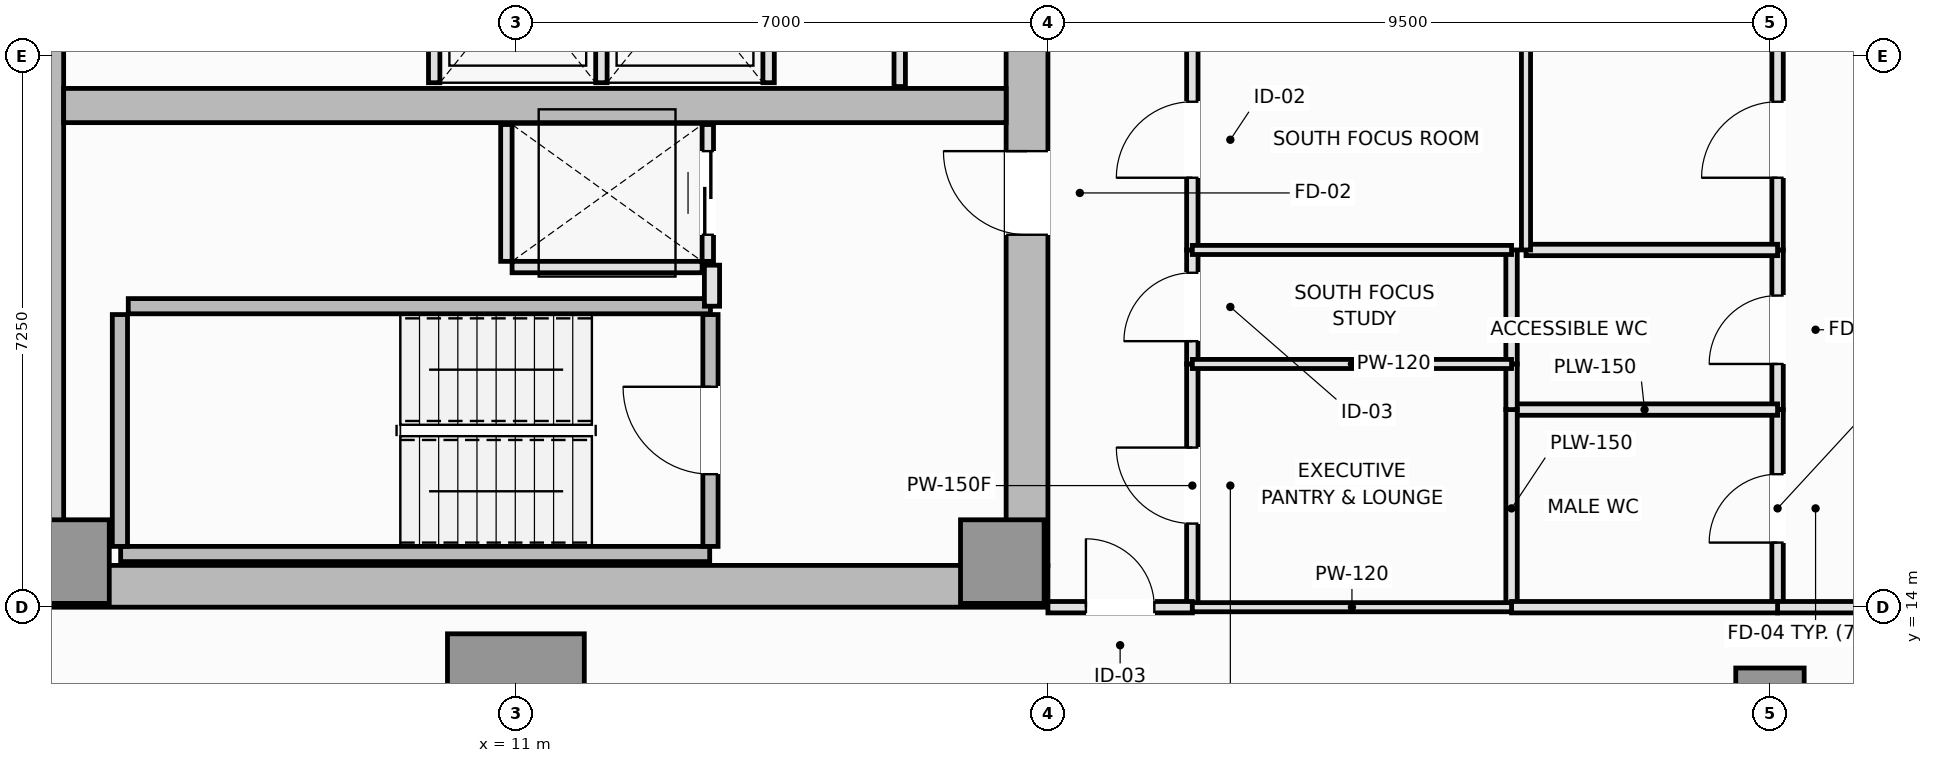
"""IFC4 building model, lengths in metres.
Left out: names, types, materials, properties, quantities, classifications, styles, units other than length and angle.
Written with IfcOpenShell. Run it as: python <this file> out.ifc"""

import sys

from ifc_helpers import new_model, si_unit, direction, frame, frame_2d, origin, origin_2d, place, context, subcontext, project, spatial, rectangle, extrude, element, fill, save


model = new_model("IFC4")
c1 = context("Model", 3, precision=1e-05, world=origin(), true_north=direction((0.0, 1.0)))
c2 = subcontext(c1, "Body", "Model", "MODEL_VIEW")
j1 = project(units=[si_unit("LENGTHUNIT", "METRE"), si_unit("PLANEANGLEUNIT", "RADIAN")], contexts=[c1])
p1 = place(None, origin())
s1 = spatial("IfcSite", under=j1, at=p1, CompositionType="ELEMENT")
p2 = place(p1, origin())
s2 = spatial("IfcBuilding", under=s1, at=p2, CompositionType="ELEMENT")
p3 = place(p2, frame((0.0, 0.0, 191.6)))
s3 = spatial("IfcBuildingStorey", under=s2, at=p3, CompositionType="ELEMENT", Elevation=191.6)
p4 = place(p3, frame((4.5, 14.275, 0.0), z_axis=(0.0, 0.0, 1.0), x_axis=(1.0, 0.0, 0.0)))
e1 = element("IfcWall", 1, at=p4, inside=s3, PredefinedType="SHEAR", context=c2, shape_type="SweptSolid", body=[
    extrude(rectangle(XDim=13.5, YDim=0.55, at=frame_2d((6.75, 0.0))), origin(), (0.0, 0.0, 1.0), 3.55),
])
p5 = place(p3, frame((4.775, 14.55, 0.0), z_axis=(0.0, 0.0, 1.0), x_axis=(0.0, 1.0, 0.0)))
e2 = element("IfcWall", 2, at=p5, inside=s3, PredefinedType="SHEAR", context=c2, shape_type="SweptSolid", body=[
    extrude(rectangle(XDim=21.4, YDim=0.55, at=frame_2d((10.7, 0.0))), origin(), (0.0, 0.0, 1.0), 3.55),
])
p6 = place(p3, frame((17.725, 14.55, 0.0), z_axis=(0.0, 0.0, 1.0), x_axis=(0.0, 1.0, 0.0)))
e3 = element("IfcWall", 3, at=p6, inside=s3, PredefinedType="SHEAR", context=c2, shape_type="SweptSolid", body=[
    extrude(rectangle(XDim=8.9, YDim=0.55, at=frame_2d((4.45, 0.0))), origin(), (0.0, 0.0, 1.0), 3.55),
])
p7 = place(p6, frame((4.35, 0.0, 0.0)))
e4 = element("IfcOpeningElement", 4, at=p7, cuts=e3, PredefinedType="OPENING", context=c2, shape_type="SweptSolid", body=[
    extrude(rectangle(XDim=1.1, YDim=2.15, at=frame_2d((0.55, 1.075))), frame((0.0, 0.285, 0.0), z_axis=(0.0, -1.0, 0.0), x_axis=(1.0, 0.0, 0.0)), (0.0, 0.0, 1.0), 0.57),
])
p8 = place(p3, frame((5.05, 20.6, 0.0), z_axis=(0.0, 0.0, 1.0), x_axis=(1.0, 0.0, 0.0)))
e5 = element("IfcWall", 5, at=p8, inside=s3, PredefinedType="SHEAR", context=c2, shape_type="SweptSolid", body=[
    extrude(rectangle(XDim=12.4, YDim=0.45, at=frame_2d((6.2, 0.0))), origin(), (0.0, 0.0, 1.0), 3.55),
])
for number, where, z_axis, x_axis in (
    (6, (5.1, 14.6, 0.0), (0.0, 0.0, 1.0), (1.0, 0.0, 0.0)),
    (7, (17.4, 14.6, 0.0), (0.0, 0.0, 1.0), (1.0, 0.0, 0.0)),
):
    element("IfcColumn", number, at=place(p3, frame(where, z_axis=z_axis, x_axis=x_axis)), inside=s3, PredefinedType="PILASTER", context=c2, shape_type="SweptSolid", body=[
        extrude(rectangle(XDim=1.1, YDim=1.1, at=origin_2d()), origin(), (0.0, 0.0, 1.0), 3.55),
    ])
p9 = place(p3, frame((11.0, 12.75, 0.0), z_axis=(0.0, 0.0, 1.0), x_axis=(1.0, 0.0, 0.0)))
e8 = element("IfcColumn", 8, at=p9, inside=s3, PredefinedType="COLUMN", context=c2, shape_type="SweptSolid", body=[
    extrude(rectangle(XDim=1.8, YDim=1.8, at=origin_2d()), origin(), (0.0, 0.0, 1.0), 3.55),
])
p10 = place(p3, frame((27.5, 12.75, 0.0), z_axis=(0.0, 0.0, 1.0), x_axis=(1.0, 0.0, 0.0)))
e9 = element("IfcColumn", 9, at=p10, inside=s3, PredefinedType="COLUMN", context=c2, shape_type="SweptSolid", body=[
    extrude(rectangle(XDim=0.9, YDim=0.9, at=origin_2d()), origin(), (0.0, 0.0, 1.0), 3.55),
])
p11 = place(p3, frame((5.8, 14.7, 0.0), z_axis=(0.0, 0.0, 1.0), x_axis=(1.0, 0.0, 0.0)))
e10 = element("IfcWall", 10, at=p11, inside=s3, PredefinedType="SOLIDWALL", context=c2, shape_type="SweptSolid", body=[
    extrude(rectangle(XDim=7.75, YDim=0.2, at=frame_2d((3.875, 0.0))), origin(), (0.0, 0.0, 1.0), 3.55),
])
p12 = place(p3, frame((5.79, 14.8, 0.0), z_axis=(0.0, 0.0, 1.0), x_axis=(0.0, 1.0, 0.0)))
e11 = element("IfcWall", 11, at=p12, inside=s3, PredefinedType="SOLIDWALL", context=c2, shape_type="SweptSolid", body=[
    extrude(rectangle(XDim=3.05, YDim=0.2, at=frame_2d((1.525, 0.0))), origin(), (0.0, 0.0, 1.0), 3.55),
])
p13 = place(p3, frame((5.9, 17.96, 0.0), z_axis=(0.0, 0.0, 1.0), x_axis=(1.0, 0.0, 0.0)))
e12 = element("IfcWall", 12, at=p13, inside=s3, PredefinedType="SOLIDWALL", context=c2, shape_type="SweptSolid", body=[
    extrude(rectangle(XDim=7.66, YDim=0.2, at=frame_2d((3.83, 0.0))), origin(), (0.0, 0.0, 1.0), 3.55),
])
p14 = place(p3, frame((13.56, 14.8, 0.0), z_axis=(0.0, 0.0, 1.0), x_axis=(0.0, 1.0, 0.0)))
e13 = element("IfcWall", 13, at=p14, inside=s3, PredefinedType="SOLIDWALL", context=c2, shape_type="SweptSolid", body=[
    extrude(rectangle(XDim=3.05, YDim=0.2, at=frame_2d((1.525, 0.0))), origin(), (0.0, 0.0, 1.0), 3.55),
])
p15 = place(p14, frame((0.95, 0.0, 0.0)))
e14 = element("IfcOpeningElement", 14, at=p15, cuts=e13, PredefinedType="OPENING", context=c2, shape_type="SweptSolid", body=[
    extrude(rectangle(XDim=1.15, YDim=2.15, at=frame_2d((0.575, 1.075))), frame((0.0, 0.11, 0.0), z_axis=(0.0, -1.0, 0.0), x_axis=(1.0, 0.0, 0.0)), (0.0, 0.0, 1.0), 0.22),
])
for number, where, z_axis, x_axis in (
    (15, (9.925, 20.9, 0.0), (0.0, 0.0, 1.0), (0.0, 1.0, 0.0)),
    (16, (12.125, 20.9, 0.0), (0.0, 0.0, 1.0), (0.0, 1.0, 0.0)),
    (17, (14.325, 20.9, 0.0), (0.0, 0.0, 1.0), (0.0, 1.0, 0.0)),
):
    element("IfcWall", number, at=place(p3, frame(where, z_axis=z_axis, x_axis=x_axis)), inside=s3, PredefinedType="PARTITIONING", context=c2, shape_type="SweptSolid", body=[
        extrude(rectangle(XDim=2.55, YDim=0.15, at=frame_2d((1.275, 0.0))), origin(), (0.0, 0.0, 1.0), 3.37),
    ])
p16 = place(p3, frame((10.95, 18.475, 0.0), z_axis=(0.0, 0.0, 1.0), x_axis=(1.0, 0.0, 0.0)))
e18 = element("IfcWall", 18, at=p16, inside=s3, PredefinedType="PARTITIONING", context=c2, shape_type="SweptSolid", body=[
    extrude(rectangle(XDim=2.5, YDim=0.15, at=frame_2d((1.25, 0.0))), origin(), (0.0, 0.0, 1.0), 3.37),
])
p17 = place(p3, frame((10.875, 18.55, 0.0), z_axis=(0.0, 0.0, 1.0), x_axis=(0.0, 1.0, 0.0)))
e19 = element("IfcWall", 19, at=p17, inside=s3, PredefinedType="PARTITIONING", context=c2, shape_type="SweptSolid", body=[
    extrude(rectangle(XDim=1.8, YDim=0.15, at=frame_2d((0.9, 0.0))), origin(), (0.0, 0.0, 1.0), 3.37),
])
p18 = place(p3, frame((13.525, 18.55, 0.0), z_axis=(0.0, 0.0, 1.0), x_axis=(0.0, 1.0, 0.0)))
e20 = element("IfcWall", 20, at=p18, inside=s3, PredefinedType="PARTITIONING", context=c2, shape_type="SweptSolid", body=[
    extrude(rectangle(XDim=1.8, YDim=0.15, at=frame_2d((0.9, 0.0))), origin(), (0.0, 0.0, 1.0), 3.37),
])
p19 = place(p18, frame((0.35, 0.0, 0.0)))
e21 = element("IfcOpeningElement", 21, at=p19, cuts=e20, PredefinedType="OPENING", context=c2, shape_type="SweptSolid", body=[
    extrude(rectangle(XDim=1.1, YDim=2.2, at=frame_2d((0.55, 1.1))), frame((0.0, 0.085, 0.0), z_axis=(0.0, -1.0, 0.0), x_axis=(1.0, 0.0, 0.0)), (0.0, 0.0, 1.0), 0.17),
])
p20 = place(p3, frame((13.58, 17.96, 0.0), z_axis=(0.0, 0.0, 1.0), x_axis=(0.0, 1.0, 0.0)))
e22 = element("IfcWall", 22, at=p20, inside=s3, PredefinedType="PARTITIONING", context=c2, shape_type="SweptSolid", body=[
    extrude(rectangle(XDim=0.54, YDim=0.2, at=frame_2d((0.27, 0.0))), origin(), (0.0, 0.0, 1.0), 3.37),
])
p21 = place(p3, frame((16.05, 20.85, 0.0), z_axis=(0.0, 0.0, 1.0), x_axis=(0.0, 1.0, 0.0)))
e23 = element("IfcWall", 23, at=p21, inside=s3, PredefinedType="PARTITIONING", context=c2, shape_type="SweptSolid", body=[
    extrude(rectangle(XDim=2.67, YDim=0.15, at=frame_2d((1.335, 0.0))), origin(), (0.0, 0.0, 1.0), 3.37),
])
p22 = place(p21, frame((0.885, 0.0, 0.0)))
e24 = element("IfcOpeningElement", 24, at=p22, cuts=e23, PredefinedType="OPENING", context=c2, shape_type="SweptSolid", body=[
    extrude(rectangle(XDim=0.9, YDim=2.1, at=frame_2d((0.45, 1.05))), frame((0.0, 0.085, 0.0), z_axis=(0.0, -1.0, 0.0), x_axis=(1.0, 0.0, 0.0)), (0.0, 0.0, 1.0), 0.17),
])
p23 = place(p3, frame((19.9, 14.0, 0.0), z_axis=(0.0, 0.0, 1.0), x_axis=(0.0, 1.0, 0.0)))
e25 = element("IfcWall", 25, at=p23, inside=s3, PredefinedType="PARTITIONING", context=c2, shape_type="SweptSolid", body=[
    extrude(rectangle(XDim=3.2, YDim=0.15, at=frame_2d((1.6, 0.0))), origin(), (0.0, 0.0, 1.0), 3.37),
])
p24 = place(p23, frame((1.1, 0.0, 0.0)))
e26 = element("IfcOpeningElement", 26, at=p24, cuts=e25, PredefinedType="OPENING", context=c2, shape_type="SweptSolid", body=[
    extrude(rectangle(XDim=1.0, YDim=2.15, at=frame_2d((0.5, 1.075))), frame((0.0, 0.085, 0.0), z_axis=(0.0, -1.0, 0.0), x_axis=(1.0, 0.0, 0.0)), (0.0, 0.0, 1.0), 0.17),
])
p25 = place(p3, frame((19.9, 17.2, 0.0), z_axis=(0.0, 0.0, 1.0), x_axis=(0.0, 1.0, 0.0)))
e27 = element("IfcWall", 27, at=p25, inside=s3, PredefinedType="PARTITIONING", context=c2, shape_type="SweptSolid", body=[
    extrude(rectangle(XDim=1.5, YDim=0.15, at=frame_2d((0.75, 0.0))), origin(), (0.0, 0.0, 1.0), 3.37),
])
p26 = place(p25, frame((0.3, 0.0, 0.0)))
e28 = element("IfcOpeningElement", 28, at=p26, cuts=e27, PredefinedType="OPENING", context=c2, shape_type="SweptSolid", body=[
    extrude(rectangle(XDim=0.9, YDim=2.1, at=frame_2d((0.45, 1.05))), frame((0.0, 0.085, 0.0), z_axis=(0.0, -1.0, 0.0), x_axis=(1.0, 0.0, 0.0)), (0.0, 0.0, 1.0), 0.17),
])
p27 = place(p3, frame((19.9, 18.7, 0.0), z_axis=(0.0, 0.0, 1.0), x_axis=(0.0, 1.0, 0.0)))
e29 = element("IfcWall", 29, at=p27, inside=s3, PredefinedType="PARTITIONING", context=c2, shape_type="SweptSolid", body=[
    extrude(rectangle(XDim=2.9, YDim=0.15, at=frame_2d((1.45, 0.0))), origin(), (0.0, 0.0, 1.0), 3.37),
])
p28 = place(p27, frame((0.95, 0.0, 0.0)))
e30 = element("IfcOpeningElement", 30, at=p28, cuts=e29, PredefinedType="OPENING", context=c2, shape_type="SweptSolid", body=[
    extrude(rectangle(XDim=1.0, YDim=2.15, at=frame_2d((0.5, 1.075))), frame((0.0, 0.085, 0.0), z_axis=(0.0, -1.0, 0.0), x_axis=(1.0, 0.0, 0.0)), (0.0, 0.0, 1.0), 0.17),
])
p29 = place(p3, frame((18.0, 14.0, 0.0), z_axis=(0.0, 0.0, 1.0), x_axis=(1.0, 0.0, 0.0)))
e31 = element("IfcWall", 31, at=p29, inside=s3, PredefinedType="PARTITIONING", context=c2, shape_type="SweptSolid", body=[
    extrude(rectangle(XDim=1.9, YDim=0.15, at=frame_2d((0.95, 0.0))), origin(), (0.0, 0.0, 1.0), 3.37),
])
p30 = place(p29, frame((0.5, 0.0, 0.0)))
e32 = element("IfcOpeningElement", 32, at=p30, cuts=e31, PredefinedType="OPENING", context=c2, shape_type="SweptSolid", body=[
    extrude(rectangle(XDim=0.9, YDim=2.1, at=frame_2d((0.45, 1.05))), frame((0.0, 0.085, 0.0), z_axis=(0.0, -1.0, 0.0), x_axis=(1.0, 0.0, 0.0)), (0.0, 0.0, 1.0), 0.17),
])
p31 = place(p3, frame((27.6, 14.0, 0.0), z_axis=(0.0, 0.0, 1.0), x_axis=(0.0, 1.0, 0.0)))
e33 = element("IfcWall", 33, at=p31, inside=s3, PredefinedType="PLUMBINGWALL", context=c2, shape_type="SweptSolid", body=[
    extrude(rectangle(XDim=2.6, YDim=0.15, at=frame_2d((1.3, 0.0))), origin(), (0.0, 0.0, 1.0), 3.37),
])
p32 = place(p31, frame((0.85, 0.0, 0.0)))
e34 = element("IfcOpeningElement", 34, at=p32, cuts=e33, PredefinedType="OPENING", context=c2, shape_type="SweptSolid", body=[
    extrude(rectangle(XDim=0.9, YDim=2.1, at=frame_2d((0.45, 1.05))), frame((0.0, 0.085, 0.0), z_axis=(0.0, -1.0, 0.0), x_axis=(1.0, 0.0, 0.0)), (0.0, 0.0, 1.0), 0.17),
])
p33 = place(p3, frame((27.6, 16.6, 0.0), z_axis=(0.0, 0.0, 1.0), x_axis=(0.0, 1.0, 0.0)))
e35 = element("IfcWall", 35, at=p33, inside=s3, PredefinedType="PLUMBINGWALL", context=c2, shape_type="SweptSolid", body=[
    extrude(rectangle(XDim=2.1, YDim=0.15, at=frame_2d((1.05, 0.0))), origin(), (0.0, 0.0, 1.0), 3.37),
])
p34 = place(p33, frame((0.6, 0.0, 0.0)))
e36 = element("IfcOpeningElement", 36, at=p34, cuts=e35, PredefinedType="OPENING", context=c2, shape_type="SweptSolid", body=[
    extrude(rectangle(XDim=0.9, YDim=2.1, at=frame_2d((0.45, 1.05))), frame((0.0, 0.085, 0.0), z_axis=(0.0, -1.0, 0.0), x_axis=(1.0, 0.0, 0.0)), (0.0, 0.0, 1.0), 0.17),
])
p35 = place(p3, frame((27.6, 18.7, 0.0), z_axis=(0.0, 0.0, 1.0), x_axis=(0.0, 1.0, 0.0)))
e37 = element("IfcWall", 37, at=p35, inside=s3, PredefinedType="PARTITIONING", context=c2, shape_type="SweptSolid", body=[
    extrude(rectangle(XDim=2.9, YDim=0.15, at=frame_2d((1.45, 0.0))), origin(), (0.0, 0.0, 1.0), 3.37),
])
p36 = place(p35, frame((0.95, 0.0, 0.0)))
e38 = element("IfcOpeningElement", 38, at=p36, cuts=e37, PredefinedType="OPENING", context=c2, shape_type="SweptSolid", body=[
    extrude(rectangle(XDim=1.0, YDim=2.15, at=frame_2d((0.5, 1.075))), frame((0.0, 0.085, 0.0), z_axis=(0.0, -1.0, 0.0), x_axis=(1.0, 0.0, 0.0)), (0.0, 0.0, 1.0), 0.17),
])
p37 = place(p3, frame((27.6, 14.0, 0.0), z_axis=(0.0, 0.0, 1.0), x_axis=(1.0, 0.0, 0.0)))
e39 = element("IfcWall", 39, at=p37, inside=s3, PredefinedType="PARTITIONING", context=c2, shape_type="SweptSolid", body=[
    extrude(rectangle(XDim=1.9, YDim=0.15, at=frame_2d((0.95, 0.0))), origin(), (0.0, 0.0, 1.0), 3.37),
])
p38 = place(p3, frame((24.1, 16.6, 0.0), z_axis=(0.0, 0.0, 1.0), x_axis=(1.0, 0.0, 0.0)))
e40 = element("IfcWall", 40, at=p38, inside=s3, PredefinedType="PLUMBINGWALL", context=c2, shape_type="SweptSolid", body=[
    extrude(rectangle(XDim=3.5, YDim=0.15, at=frame_2d((1.75, 0.0))), origin(), (0.0, 0.0, 1.0), 3.37),
])
p39 = place(p3, frame((24.1, 14.0, 0.0), z_axis=(0.0, 0.0, 1.0), x_axis=(0.0, 1.0, 0.0)))
e41 = element("IfcWall", 41, at=p39, inside=s3, PredefinedType="PLUMBINGWALL", context=c2, shape_type="SweptSolid", body=[
    extrude(rectangle(XDim=2.6, YDim=0.15, at=frame_2d((1.3, 0.0))), origin(), (0.0, 0.0, 1.0), 3.07),
])
p40 = place(p3, frame((24.1, 14.0, 0.0), z_axis=(0.0, 0.0, 1.0), x_axis=(1.0, 0.0, 0.0)))
e42 = element("IfcWall", 42, at=p40, inside=s3, PredefinedType="PLUMBINGWALL", context=c2, shape_type="SweptSolid", body=[
    extrude(rectangle(XDim=3.5, YDim=0.15, at=frame_2d((1.75, 0.0))), origin(), (0.0, 0.0, 1.0), 3.37),
])
p41 = place(p3, frame((24.1, 16.6, 0.0), z_axis=(0.0, 0.0, 1.0), x_axis=(0.0, 1.0, 0.0)))
e43 = element("IfcWall", 43, at=p41, inside=s3, PredefinedType="PLUMBINGWALL", context=c2, shape_type="SweptSolid", body=[
    extrude(rectangle(XDim=0.6, YDim=0.15, at=frame_2d((0.3, 0.0))), origin(), (0.0, 0.0, 1.0), 3.07),
])
p42 = place(p3, frame((24.1, 17.2, 0.0), z_axis=(0.0, 0.0, 1.0), x_axis=(0.0, 1.0, 0.0)))
e44 = element("IfcWall", 44, at=p42, inside=s3, PredefinedType="PLUMBINGWALL", context=c2, shape_type="SweptSolid", body=[
    extrude(rectangle(XDim=1.5, YDim=0.15, at=frame_2d((0.75, 0.0))), origin(), (0.0, 0.0, 1.0), 3.07),
])
p43 = place(p3, frame((24.29, 18.7, 0.0), z_axis=(0.0, 0.0, 1.0), x_axis=(1.0, 0.0, 0.0)))
e45 = element("IfcWall", 45, at=p43, inside=s3, PredefinedType="PLUMBINGWALL", context=c2, shape_type="SweptSolid", body=[
    extrude(rectangle(XDim=3.31, YDim=0.15, at=frame_2d((1.655, 0.0))), origin(), (0.0, 0.0, 1.0), 3.37),
])
for number, where, z_axis, x_axis in (
    (46, (19.9, 17.2, 0.0), (0.0, 0.0, 1.0), (1.0, 0.0, 0.0)),
    (47, (19.9, 14.0, 0.0), (0.0, 0.0, 1.0), (1.0, 0.0, 0.0)),
    (48, (19.9, 18.7, 0.0), (0.0, 0.0, 1.0), (1.0, 0.0, 0.0)),
):
    element("IfcWall", number, at=place(p3, frame(where, z_axis=z_axis, x_axis=x_axis)), inside=s3, PredefinedType="PARTITIONING", context=c2, shape_type="SweptSolid", body=[
        extrude(rectangle(XDim=4.2, YDim=0.12, at=frame_2d((2.1, 0.0))), origin(), (0.0, 0.0, 1.0), 3.37),
    ])
p44 = place(p3, frame((24.29, 18.7, 0.0), z_axis=(0.0, 0.0, 1.0), x_axis=(0.0, 1.0, 0.0)))
e49 = element("IfcWall", 49, at=p44, inside=s3, PredefinedType="PARTITIONING", context=c2, shape_type="SweptSolid", body=[
    extrude(rectangle(XDim=2.9, YDim=0.12, at=frame_2d((1.45, 0.0))), origin(), (0.0, 0.0, 1.0), 3.37),
])
p45 = place(p15, origin())
e50 = element("IfcDoor", 50, at=p45, inside=s3, OperationType="SINGLE_SWING_RIGHT", PredefinedType="DOOR", context=c2, shape_type="SweptSolid", body=[
    extrude(rectangle(XDim=1.15, YDim=2.15, at=frame_2d((0.575, 1.075))), frame((0.0, 0.025, 0.0), z_axis=(0.0, -1.0, 0.0), x_axis=(1.0, 0.0, 0.0)), (0.0, 0.0, 1.0), 0.05),
])
fill(e14, e50)
p46 = place(p19, origin())
e51 = element("IfcDoor", 51, at=p46, inside=s3, OperationType="DOUBLE_DOOR_SLIDING", PredefinedType="DOOR", context=c2, shape_type="SweptSolid", body=[
    extrude(rectangle(XDim=1.1, YDim=2.2, at=frame_2d((0.55, 1.1))), frame((0.0, 0.025, 0.0), z_axis=(0.0, -1.0, 0.0), x_axis=(1.0, 0.0, 0.0)), (0.0, 0.0, 1.0), 0.05),
])
fill(e21, e51)
p47 = place(p7, origin())
e52 = element("IfcDoor", 52, at=p47, inside=s3, OperationType="SINGLE_SWING_RIGHT", PredefinedType="DOOR", context=c2, shape_type="SweptSolid", body=[
    extrude(rectangle(XDim=1.1, YDim=2.15, at=frame_2d((0.55, 1.075))), frame((0.0, 0.025, 0.0), z_axis=(0.0, -1.0, 0.0), x_axis=(1.0, 0.0, 0.0)), (0.0, 0.0, 1.0), 0.05),
])
fill(e4, e52)
p48 = place(p24, origin())
e53 = element("IfcDoor", 53, at=p48, inside=s3, OperationType="SINGLE_SWING_RIGHT", PredefinedType="DOOR", context=c2, shape_type="SweptSolid", body=[
    extrude(rectangle(XDim=1.0, YDim=2.15, at=frame_2d((0.5, 1.075))), frame((0.0, 0.025, 0.0), z_axis=(0.0, -1.0, 0.0), x_axis=(1.0, 0.0, 0.0)), (0.0, 0.0, 1.0), 0.05),
])
fill(e26, e53)
p49 = place(p26, origin())
e54 = element("IfcDoor", 54, at=p49, inside=s3, OperationType="SINGLE_SWING_LEFT", PredefinedType="DOOR", context=c2, shape_type="SweptSolid", body=[
    extrude(rectangle(XDim=0.9, YDim=2.1, at=frame_2d((0.45, 1.05))), frame((0.0, 0.025, 0.0), z_axis=(0.0, -1.0, 0.0), x_axis=(1.0, 0.0, 0.0)), (0.0, 0.0, 1.0), 0.05),
])
fill(e28, e54)
p50 = place(p28, origin())
e55 = element("IfcDoor", 55, at=p50, inside=s3, OperationType="SINGLE_SWING_LEFT", PredefinedType="DOOR", context=c2, shape_type="SweptSolid", body=[
    extrude(rectangle(XDim=1.0, YDim=2.15, at=frame_2d((0.5, 1.075))), frame((0.0, 0.025, 0.0), z_axis=(0.0, -1.0, 0.0), x_axis=(1.0, 0.0, 0.0)), (0.0, 0.0, 1.0), 0.05),
])
fill(e30, e55)
p51 = place(p30, origin())
e56 = element("IfcDoor", 56, at=p51, inside=s3, OperationType="SINGLE_SWING_LEFT", PredefinedType="DOOR", context=c2, shape_type="SweptSolid", body=[
    extrude(rectangle(XDim=0.9, YDim=2.1, at=frame_2d((0.45, 1.05))), frame((0.0, 0.025, 0.0), z_axis=(0.0, -1.0, 0.0), x_axis=(1.0, 0.0, 0.0)), (0.0, 0.0, 1.0), 0.05),
])
fill(e32, e56)
p52 = place(p32, origin())
e57 = element("IfcDoor", 57, at=p52, inside=s3, OperationType="SINGLE_SWING_LEFT", PredefinedType="DOOR", context=c2, shape_type="SweptSolid", body=[
    extrude(rectangle(XDim=0.9, YDim=2.1, at=frame_2d((0.45, 1.05))), frame((0.0, 0.025, 0.0), z_axis=(0.0, -1.0, 0.0), x_axis=(1.0, 0.0, 0.0)), (0.0, 0.0, 1.0), 0.05),
])
fill(e34, e57)
p53 = place(p34, origin())
e58 = element("IfcDoor", 58, at=p53, inside=s3, OperationType="SINGLE_SWING_LEFT", PredefinedType="DOOR", context=c2, shape_type="SweptSolid", body=[
    extrude(rectangle(XDim=0.9, YDim=2.1, at=frame_2d((0.45, 1.05))), frame((0.0, 0.025, 0.0), z_axis=(0.0, -1.0, 0.0), x_axis=(1.0, 0.0, 0.0)), (0.0, 0.0, 1.0), 0.05),
])
fill(e36, e58)
p54 = place(p36, origin())
e59 = element("IfcDoor", 59, at=p54, inside=s3, OperationType="SINGLE_SWING_LEFT", PredefinedType="DOOR", context=c2, shape_type="SweptSolid", body=[
    extrude(rectangle(XDim=1.0, YDim=2.15, at=frame_2d((0.5, 1.075))), frame((0.0, 0.025, 0.0), z_axis=(0.0, -1.0, 0.0), x_axis=(1.0, 0.0, 0.0)), (0.0, 0.0, 1.0), 0.05),
])
fill(e38, e59)
save(model, sys.argv[1])
